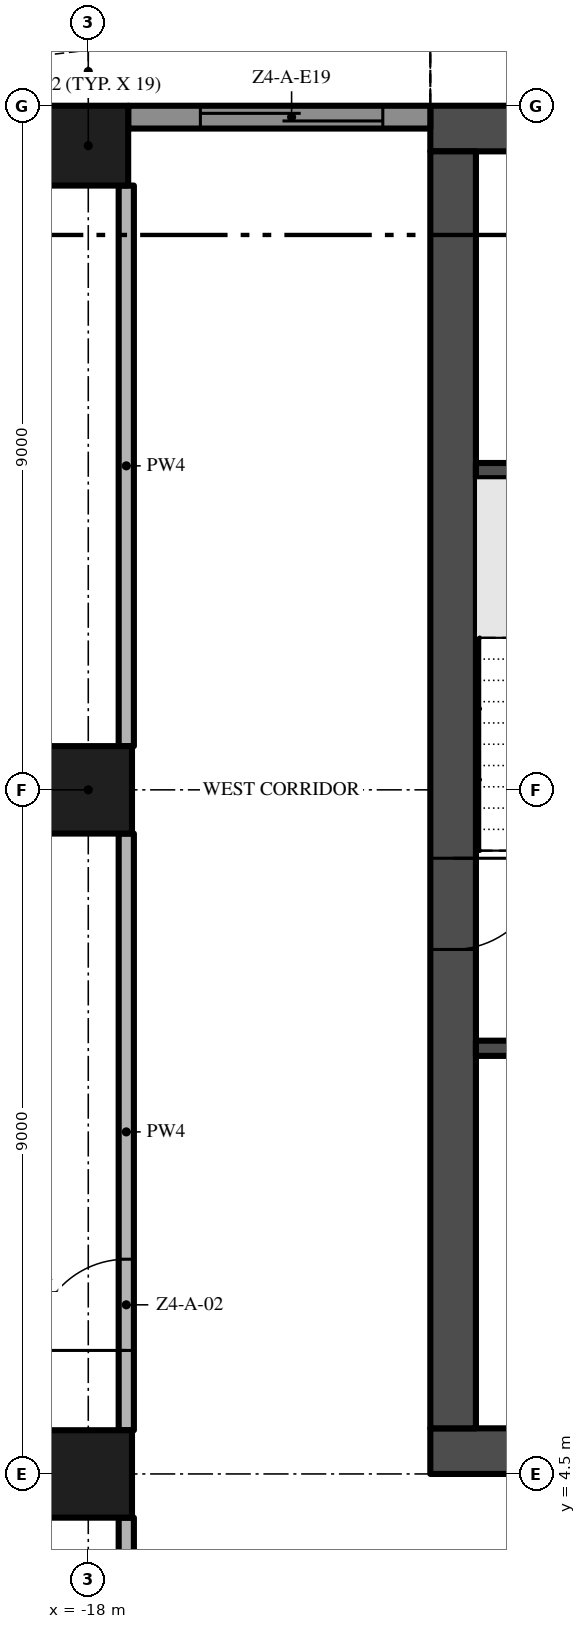
"""IFC4 building model, lengths in metres.
Left out: names, types, materials, properties, quantities, classifications, styles, units other than length and angle.
Written with IfcOpenShell. Run it as: python <this file> out.ifc"""

import sys

from ifc_helpers import new_model, si_unit, direction, frame, frame_2d, origin, origin_2d, place, context, subcontext, project, spatial, polyline, rectangle, outline, extrude, element, fill, save


model = new_model("IFC4")
c1 = context("Model", 3, precision=1e-05, world=origin(), true_north=direction((0.0, 1.0)))
c2 = subcontext(c1, "Body", "Model", "MODEL_VIEW")
j1 = project(units=[si_unit("LENGTHUNIT", "METRE"), si_unit("PLANEANGLEUNIT", "RADIAN")], contexts=[c1])
p1 = place(None, origin())
s1 = spatial("IfcSite", under=j1, at=p1, CompositionType="ELEMENT")
p2 = place(p1, origin())
s2 = spatial("IfcBuilding", under=s1, at=p2, CompositionType="ELEMENT")
p3 = place(p2, frame((0.0, 0.0, 192.0)))
s3 = spatial("IfcBuildingStorey", under=s2, at=p3, CompositionType="ELEMENT", Elevation=192.0)
p4 = place(p3, frame((-13.5, 4.8, -0.3), z_axis=(0.0, 0.0, 1.0), x_axis=(1.0, 0.0, 0.0)))
e1 = element("IfcWall", 1, at=p4, inside=s3, PredefinedType="SHEAR", context=c2, shape_type="SweptSolid", body=[
    extrude(rectangle(XDim=27.0, YDim=0.6, at=frame_2d((13.5, 0.0))), origin(), (0.0, 0.0, 1.0), 3.8),
])
p5 = place(p4, frame((12.0, 0.0, 0.3)))
e2 = element("IfcOpeningElement", 2, at=p5, cuts=e1, PredefinedType="OPENING", context=c2, shape_type="SweptSolid", body=[
    extrude(rectangle(XDim=3.0, YDim=2.4, at=frame_2d((1.5, 1.2))), frame((0.0, 0.31, 0.0), z_axis=(0.0, -1.0, 0.0), x_axis=(1.0, 0.0, 0.0)), (0.0, 0.0, 1.0), 0.62),
])
p6 = place(p4, frame((4.9, 0.0, 0.3)))
e3 = element("IfcOpeningElement", 3, at=p6, cuts=e1, PredefinedType="OPENING", context=c2, shape_type="SweptSolid", body=[
    extrude(rectangle(XDim=1.2, YDim=2.2, at=frame_2d((0.6, 1.1))), frame((0.0, 0.31, 0.0), z_axis=(0.0, -1.0, 0.0), x_axis=(1.0, 0.0, 0.0)), (0.0, 0.0, 1.0), 0.62),
])
p7 = place(p4, frame((20.75, 0.0, 0.3)))
e4 = element("IfcOpeningElement", 4, at=p7, cuts=e1, PredefinedType="OPENING", context=c2, shape_type="SweptSolid", body=[
    extrude(rectangle(XDim=1.5, YDim=2.2, at=frame_2d((0.75, 1.1))), frame((0.0, 0.31, 0.0), z_axis=(0.0, -1.0, 0.0), x_axis=(1.0, 0.0, 0.0)), (0.0, 0.0, 1.0), 0.62),
])
p8 = place(p4, frame((17.4, 0.0, 0.3)))
e5 = element("IfcOpeningElement", 5, at=p8, cuts=e1, PredefinedType="OPENING", context=c2, shape_type="SweptSolid", body=[
    extrude(rectangle(XDim=1.2, YDim=2.2, at=frame_2d((0.6, 1.1))), frame((0.0, 0.31, 0.0), z_axis=(0.0, -1.0, 0.0), x_axis=(1.0, 0.0, 0.0)), (0.0, 0.0, 1.0), 0.62),
])
p9 = place(p3, frame((13.5, 22.2, -0.3), z_axis=(0.0, 0.0, 1.0), x_axis=(-1.0, 0.0, 0.0)))
e6 = element("IfcWall", 6, at=p9, inside=s3, PredefinedType="SHEAR", context=c2, shape_type="SweptSolid", body=[
    extrude(rectangle(XDim=27.0, YDim=0.6, at=frame_2d((13.5, 0.0))), origin(), (0.0, 0.0, 1.0), 3.8),
])
p10 = place(p3, frame((-13.2, 21.9, -0.3), z_axis=(0.0, 0.0, 1.0), x_axis=(0.0, -1.0, 0.0)))
e7 = element("IfcWall", 7, at=p10, inside=s3, PredefinedType="SHEAR", context=c2, shape_type="SweptSolid", body=[
    extrude(rectangle(XDim=16.8, YDim=0.6, at=frame_2d((8.4, 0.0))), origin(), (0.0, 0.0, 1.0), 3.8),
])
p11 = place(p10, frame((9.3, 0.0, 0.3)))
e8 = element("IfcOpeningElement", 8, at=p11, cuts=e7, PredefinedType="OPENING", context=c2, shape_type="SweptSolid", body=[
    extrude(rectangle(XDim=1.2, YDim=2.2, at=frame_2d((0.6, 1.1))), frame((0.0, 0.31, 0.0), z_axis=(0.0, -1.0, 0.0), x_axis=(1.0, 0.0, 0.0)), (0.0, 0.0, 1.0), 0.62),
])
p12 = place(p3, frame((-18.0, 13.5, 0.0), z_axis=(0.0, 0.0, 1.0), x_axis=(1.0, 0.0, 0.0)))
e9 = element("IfcColumn", 9, at=p12, inside=s3, PredefinedType="COLUMN", context=c2, shape_type="SweptSolid", body=[
    extrude(rectangle(XDim=1.15, YDim=1.15, at=origin_2d()), origin(), (0.0, 0.0, 1.0), 3.5),
])
p13 = place(p3, frame((-18.0, 21.975, 0.0), z_axis=(0.0, 0.0, 1.0), x_axis=(1.0, 0.0, 0.0)))
e10 = element("IfcColumn", 10, at=p13, inside=s3, PredefinedType="COLUMN", context=c2, shape_type="SweptSolid", body=[
    extrude(rectangle(XDim=1.05, YDim=1.05, at=origin_2d()), origin(), (0.0, 0.0, 1.0), 3.5),
])
p14 = place(p3, frame((-18.0, 4.5, 0.0), z_axis=(0.0, 0.0, 1.0), x_axis=(1.0, 0.0, 0.0)))
e11 = element("IfcColumn", 11, at=p14, inside=s3, PredefinedType="COLUMN", context=c2, shape_type="SweptSolid", body=[
    extrude(rectangle(XDim=1.15, YDim=1.15, at=origin_2d()), origin(), (0.0, 0.0, 1.0), 3.5),
])
p15 = place(p3, frame((-17.475, 22.35, 0.0), z_axis=(0.0, 0.0, 1.0), x_axis=(1.0, 0.0, 0.0)))
e12 = element("IfcWall", 12, at=p15, inside=s3, PredefinedType="SOLIDWALL", context=c2, shape_type="SweptSolid", body=[
    extrude(rectangle(XDim=3.975, YDim=0.3, at=frame_2d((1.988, 0.0))), origin(), (0.0, 0.0, 1.0), 3.5),
])
p16 = place(p15, frame((0.95, 0.0, 0.0)))
e13 = element("IfcOpeningElement", 13, at=p16, cuts=e12, PredefinedType="OPENING", context=c2, shape_type="SweptSolid", body=[
    extrude(rectangle(XDim=2.4, YDim=2.4, at=frame_2d((1.2, 1.2))), frame((0.0, 0.16, 0.0), z_axis=(0.0, -1.0, 0.0), x_axis=(1.0, 0.0, 0.0)), (0.0, 0.0, 1.0), 0.32),
])
p17 = place(p3, origin())
e14 = element("IfcWall", 14, at=p17, inside=s3, PredefinedType="USERDEFINED", context=c2, shape_type="SweptSolid", body=[
    extrude(outline(polyline([(-13.5, 25.149), (-15.0, 24.488), (-16.5, 23.755), (-18.0, 23.231), (-19.125, 23.1), (-19.5, 23.115), (-21.0, 23.451), (-22.5, 24.112), (-22.601, 23.883), (-21.079, 23.213), (-19.533, 22.866), (-19.115, 22.849), (-17.944, 22.986), (-16.404, 23.524), (-14.895, 24.261), (-13.399, 24.92), (-13.5, 25.149)])), origin(), (0.0, 0.0, 1.0), 0.9),
])
for number, where, z_axis, x_axis in (
    (15, (-12.9, 10.1, 0.0), (0.0, 0.0, 1.0), (1.0, 0.0, 0.0)),
    (16, (-12.9, 17.7, 0.0), (0.0, 0.0, 1.0), (1.0, 0.0, 0.0)),
):
    element("IfcWall", number, at=place(p3, frame(where, z_axis=z_axis, x_axis=x_axis)), inside=s3, PredefinedType="SHEAR", context=c2, shape_type="SweptSolid", body=[
        extrude(rectangle(XDim=3.25, YDim=0.2, at=frame_2d((1.625, 0.0))), origin(), (0.0, 0.0, 1.0), 3.5),
    ])
p18 = place(p3, frame((-17.5, -0.2, 0.0), z_axis=(0.0, 0.0, 1.0), x_axis=(0.0, 1.0, 0.0)))
e17 = element("IfcWall", 17, at=p18, inside=s3, PredefinedType="PARTITIONING", context=c2, shape_type="SweptSolid", body=[
    extrude(rectangle(XDim=4.125, YDim=0.2, at=frame_2d((2.062, 0.0))), origin(), (0.0, 0.0, 1.0), 3.5),
])
p19 = place(p3, frame((-17.5, 5.075, 0.0), z_axis=(0.0, 0.0, 1.0), x_axis=(0.0, 1.0, 0.0)))
e18 = element("IfcWall", 18, at=p19, inside=s3, PredefinedType="PARTITIONING", context=c2, shape_type="SweptSolid", body=[
    extrude(rectangle(XDim=7.85, YDim=0.2, at=frame_2d((3.925, 0.0))), origin(), (0.0, 0.0, 1.0), 3.5),
])
p20 = place(p19, frame((1.05, 0.0, 0.0)))
e19 = element("IfcOpeningElement", 19, at=p20, cuts=e18, PredefinedType="OPENING", context=c2, shape_type="SweptSolid", body=[
    extrude(rectangle(XDim=1.2, YDim=2.4, at=frame_2d((0.6, 1.2))), frame((0.0, 0.11, 0.0), z_axis=(0.0, -1.0, 0.0), x_axis=(1.0, 0.0, 0.0)), (0.0, 0.0, 1.0), 0.22),
])
p21 = place(p3, frame((-17.5, 14.075, 0.0), z_axis=(0.0, 0.0, 1.0), x_axis=(0.0, 1.0, 0.0)))
e20 = element("IfcWall", 20, at=p21, inside=s3, PredefinedType="PARTITIONING", context=c2, shape_type="SweptSolid", body=[
    extrude(rectangle(XDim=7.375, YDim=0.2, at=frame_2d((3.688, 0.0))), origin(), (0.0, 0.0, 1.0), 3.5),
])
p22 = place(p16, origin())
e21 = element("IfcDoor", 21, at=p22, inside=s3, OperationType="SINGLE_SWING_LEFT", PredefinedType="DOOR", context=c2, shape_type="SweptSolid", body=[
    extrude(rectangle(XDim=2.4, YDim=2.4, at=frame_2d((1.2, 1.2))), frame((0.0, 0.025, 0.0), z_axis=(0.0, -1.0, 0.0), x_axis=(1.0, 0.0, 0.0)), (0.0, 0.0, 1.0), 0.05),
])
fill(e13, e21)
p23 = place(p11, frame((1.2, 0.0, 0.0), z_axis=(0.0, 0.0, 1.0), x_axis=(-1.0, 0.0, 0.0)))
e22 = element("IfcDoor", 22, at=p23, inside=s3, OperationType="SINGLE_SWING_RIGHT", PredefinedType="DOOR", context=c2, shape_type="SweptSolid", body=[
    extrude(rectangle(XDim=1.2, YDim=2.2, at=frame_2d((0.6, 1.1))), frame((0.0, 0.025, 0.0), z_axis=(0.0, -1.0, 0.0), x_axis=(1.0, 0.0, 0.0)), (0.0, 0.0, 1.0), 0.05),
])
fill(e8, e22)
p24 = place(p20, origin())
e23 = element("IfcDoor", 23, at=p24, inside=s3, OperationType="SINGLE_SWING_LEFT", PredefinedType="DOOR", context=c2, shape_type="SweptSolid", body=[
    extrude(rectangle(XDim=1.2, YDim=2.4, at=frame_2d((0.6, 1.2))), frame((0.0, 0.025, 0.0), z_axis=(0.0, -1.0, 0.0), x_axis=(1.0, 0.0, 0.0)), (0.0, 0.0, 1.0), 0.05),
])
fill(e19, e23)
save(model, sys.argv[1])
